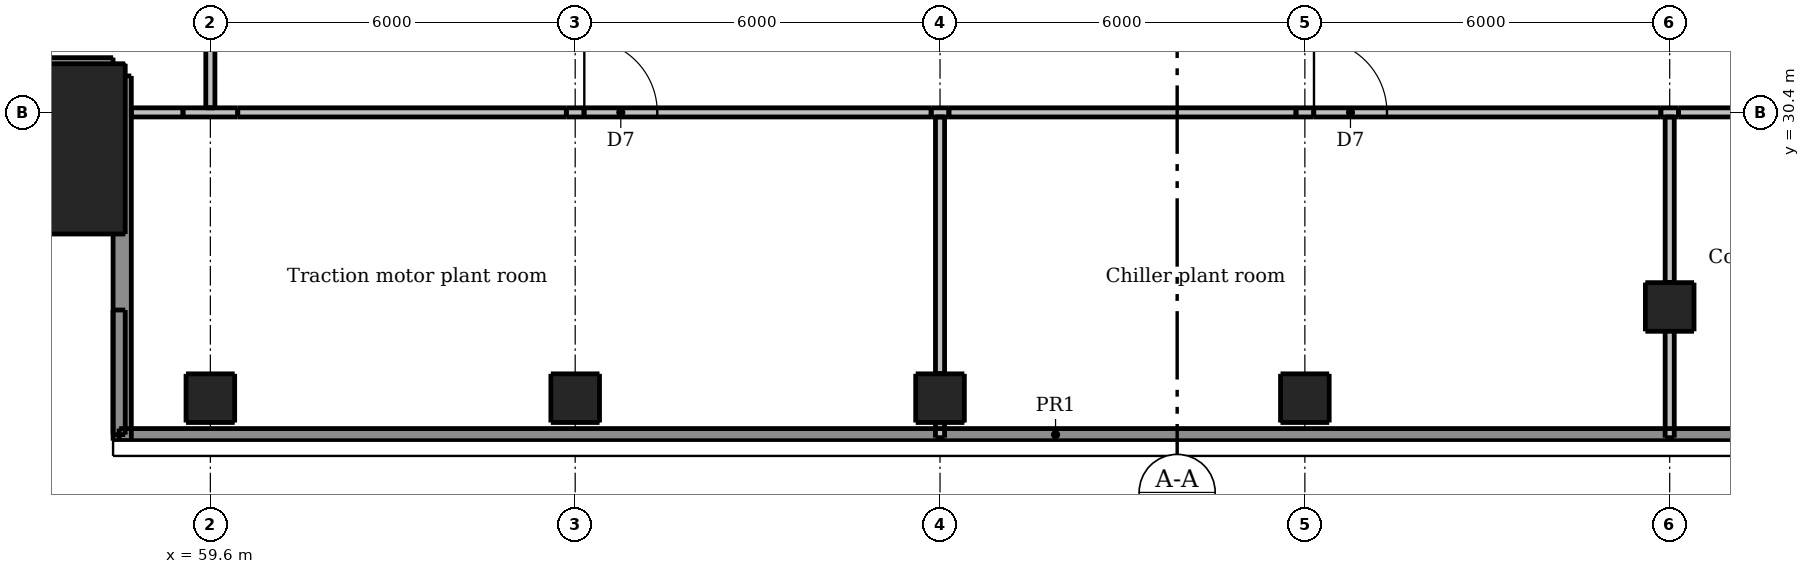
"""IFC4 building model, lengths in metres.
Left out: names, types, materials, properties, quantities, classifications, styles, units other than length and angle.
Written with IfcOpenShell. Run it as: python <this file> out.ifc"""

import sys

from ifc_helpers import new_model, si_unit, direction, frame, frame_2d, origin, origin_2d, place, context, subcontext, project, spatial, rectangle, extrude, element, fill, save


model = new_model("IFC4")
c1 = context("Model", 3, precision=1e-05, world=origin(), true_north=direction((0.0, 1.0)))
c2 = subcontext(c1, "Body", "Model", "MODEL_VIEW")
j1 = project(units=[si_unit("LENGTHUNIT", "METRE"), si_unit("PLANEANGLEUNIT", "RADIAN")], contexts=[c1])
p1 = place(None, origin())
s1 = spatial("IfcSite", under=j1, at=p1, CompositionType="ELEMENT")
p2 = place(p1, origin())
s2 = spatial("IfcBuilding", under=s1, at=p2, CompositionType="ELEMENT")
p3 = place(p2, frame((0.0, 0.0, 286.3)))
s3 = spatial("IfcBuildingStorey", under=s2, at=p3, CompositionType="ELEMENT", Elevation=286.3)
for number, where, z_axis, x_axis in (
    (1, (59.6, 25.7, 0.0), (0.0, 0.0, 1.0), (1.0, 0.0, 0.0)),
    (2, (65.6, 25.7, 0.0), (0.0, 0.0, 1.0), (1.0, 0.0, 0.0)),
    (3, (71.6, 25.7, 0.0), (0.0, 0.0, 1.0), (1.0, 0.0, 0.0)),
    (4, (77.6, 25.7, 0.0), (0.0, 0.0, 1.0), (1.0, 0.0, 0.0)),
    (5, (83.6, 27.2, 0.0), (0.0, 0.0, 1.0), (1.0, 0.0, 0.0)),
):
    element("IfcColumn", number, at=place(p3, frame(where, z_axis=z_axis, x_axis=x_axis)), inside=s3, PredefinedType="COLUMN", context=c2, shape_type="SweptSolid", body=[
        extrude(rectangle(XDim=0.8, YDim=0.8, at=origin_2d()), origin(), (0.0, 0.0, 1.0), 4.2),
    ])
p4 = place(p3, frame((56.8, 29.8, 0.0), z_axis=(0.0, 0.0, 1.0), x_axis=(1.0, 0.0, 0.0)))
e6 = element("IfcColumn", 6, at=p4, inside=s3, PredefinedType="COLUMN", context=c2, shape_type="SweptSolid", body=[
    extrude(rectangle(XDim=2.8, YDim=2.8, at=origin_2d()), origin(), (0.0, 0.0, 1.0), 4.5),
])
p5 = place(p3, frame((53.0, 31.15, 0.0), z_axis=(0.0, 0.0, 1.0), x_axis=(1.0, 0.0, 0.0)))
e7 = element("IfcWall", 7, at=p5, inside=s3, PredefinedType="SOLIDWALL", context=c2, shape_type="SweptSolid", body=[
    extrude(rectangle(XDim=5.0, YDim=0.3, at=frame_2d((2.5, 0.0))), origin(), (0.0, 0.0, 1.0), 4.2),
])
p6 = place(p3, frame((58.15, 31.0, 0.0), z_axis=(0.0, 0.0, 1.0), x_axis=(0.0, -1.0, 0.0)))
e8 = element("IfcWall", 8, at=p6, inside=s3, PredefinedType="SOLIDWALL", context=c2, shape_type="SweptSolid", body=[
    extrude(rectangle(XDim=6.0, YDim=0.3, at=frame_2d((3.0, 0.0))), origin(), (0.0, 0.0, 1.0), 4.2),
])
p7 = place(p3, frame((88.9, 25.1, 4.5), z_axis=(0.0, 0.0, 1.0), x_axis=(-1.0, 0.0, 0.0)))
e9 = element("IfcWall", 9, at=p7, inside=s3, PredefinedType="PARAPET", context=c2, shape_type="SweptSolid", body=[
    extrude(rectangle(XDim=30.8, YDim=0.2, at=frame_2d((15.4, 0.0))), origin(), (0.0, 0.0, 1.0), 1.1),
])
p8 = place(p3, frame((58.1, 25.1, 4.5), z_axis=(0.0, 0.0, 1.0), x_axis=(0.0, 1.0, 0.0)))
e10 = element("IfcWall", 10, at=p8, inside=s3, PredefinedType="PARAPET", context=c2, shape_type="SweptSolid", body=[
    extrude(rectangle(XDim=2.05, YDim=0.2, at=frame_2d((1.025, 0.0))), origin(), (0.0, 0.0, 1.0), 1.1),
])
p9 = place(p3, frame((58.3, 30.4, 0.0), z_axis=(0.0, 0.0, 1.0), x_axis=(1.0, 0.0, 0.0)))
e11 = element("IfcWall", 11, at=p9, inside=s3, PredefinedType="PARTITIONING", context=c2, shape_type="SweptSolid", body=[
    extrude(rectangle(XDim=0.85, YDim=0.15, at=frame_2d((0.425, 0.0))), origin(), (0.0, 0.0, 1.0), 4.2),
])
p10 = place(p3, frame((59.15, 30.4, 0.0), z_axis=(0.0, 0.0, 1.0), x_axis=(1.0, 0.0, 0.0)))
e12 = element("IfcWall", 12, at=p10, inside=s3, PredefinedType="PARTITIONING", context=c2, shape_type="SweptSolid", body=[
    extrude(rectangle(XDim=0.9, YDim=0.15, at=frame_2d((0.45, 0.0))), origin(), (0.0, 0.0, 1.0), 2.897),
])
p11 = place(p3, frame((60.05, 30.4, 0.0), z_axis=(0.0, 0.0, 1.0), x_axis=(1.0, 0.0, 0.0)))
e13 = element("IfcWall", 13, at=p11, inside=s3, PredefinedType="PARTITIONING", context=c2, shape_type="SweptSolid", body=[
    extrude(rectangle(XDim=5.404, YDim=0.15, at=frame_2d((2.702, 0.0))), origin(), (0.0, 0.0, 1.0), 4.2),
])
p12 = place(p3, frame((65.454, 30.4, 0.0), z_axis=(0.0, 0.0, 1.0), x_axis=(1.0, 0.0, 0.0)))
e14 = element("IfcWall", 14, at=p12, inside=s3, PredefinedType="PARTITIONING", context=c2, shape_type="SweptSolid", body=[
    extrude(rectangle(XDim=0.292, YDim=0.15, at=frame_2d((0.146, 0.0))), origin(), (0.0, 0.0, 1.0), 3.365),
])
p13 = place(p3, frame((65.746, 30.4, 0.0), z_axis=(0.0, 0.0, 1.0), x_axis=(1.0, 0.0, 0.0)))
e15 = element("IfcWall", 15, at=p13, inside=s3, PredefinedType="PARTITIONING", context=c2, shape_type="SweptSolid", body=[
    extrude(rectangle(XDim=5.708, YDim=0.15, at=frame_2d((2.854, 0.0))), origin(), (0.0, 0.0, 1.0), 4.2),
])
p14 = place(p13, frame((0.004, 0.0, 0.0)))
e16 = element("IfcOpeningElement", 16, at=p14, cuts=e15, PredefinedType="OPENING", context=c2, shape_type="SweptSolid", body=[
    extrude(rectangle(XDim=1.2, YDim=2.1, at=frame_2d((0.6, 1.05))), frame((0.0, 0.085, 0.0), z_axis=(0.0, -1.0, 0.0), x_axis=(1.0, 0.0, 0.0)), (0.0, 0.0, 1.0), 0.17),
])
p15 = place(p3, frame((71.454, 30.4, 0.0), z_axis=(0.0, 0.0, 1.0), x_axis=(1.0, 0.0, 0.0)))
e17 = element("IfcWall", 17, at=p15, inside=s3, PredefinedType="PARTITIONING", context=c2, shape_type="SweptSolid", body=[
    extrude(rectangle(XDim=0.292, YDim=0.15, at=frame_2d((0.146, 0.0))), origin(), (0.0, 0.0, 1.0), 3.365),
])
p16 = place(p3, frame((71.746, 30.4, 0.0), z_axis=(0.0, 0.0, 1.0), x_axis=(1.0, 0.0, 0.0)))
e18 = element("IfcWall", 18, at=p16, inside=s3, PredefinedType="PARTITIONING", context=c2, shape_type="SweptSolid", body=[
    extrude(rectangle(XDim=5.708, YDim=0.15, at=frame_2d((2.854, 0.0))), origin(), (0.0, 0.0, 1.0), 4.2),
])
p17 = place(p3, frame((77.454, 30.4, 0.0), z_axis=(0.0, 0.0, 1.0), x_axis=(1.0, 0.0, 0.0)))
e19 = element("IfcWall", 19, at=p17, inside=s3, PredefinedType="PARTITIONING", context=c2, shape_type="SweptSolid", body=[
    extrude(rectangle(XDim=0.292, YDim=0.15, at=frame_2d((0.146, 0.0))), origin(), (0.0, 0.0, 1.0), 3.365),
])
p18 = place(p3, frame((77.746, 30.4, 0.0), z_axis=(0.0, 0.0, 1.0), x_axis=(1.0, 0.0, 0.0)))
e20 = element("IfcWall", 20, at=p18, inside=s3, PredefinedType="PARTITIONING", context=c2, shape_type="SweptSolid", body=[
    extrude(rectangle(XDim=5.708, YDim=0.15, at=frame_2d((2.854, 0.0))), origin(), (0.0, 0.0, 1.0), 4.2),
])
p19 = place(p18, frame((0.004, 0.0, 0.0)))
e21 = element("IfcOpeningElement", 21, at=p19, cuts=e20, PredefinedType="OPENING", context=c2, shape_type="SweptSolid", body=[
    extrude(rectangle(XDim=1.2, YDim=2.1, at=frame_2d((0.6, 1.05))), frame((0.0, 0.085, 0.0), z_axis=(0.0, -1.0, 0.0), x_axis=(1.0, 0.0, 0.0)), (0.0, 0.0, 1.0), 0.17),
])
p20 = place(p3, frame((83.454, 30.4, 0.0), z_axis=(0.0, 0.0, 1.0), x_axis=(1.0, 0.0, 0.0)))
e22 = element("IfcWall", 22, at=p20, inside=s3, PredefinedType="PARTITIONING", context=c2, shape_type="SweptSolid", body=[
    extrude(rectangle(XDim=0.292, YDim=0.15, at=frame_2d((0.146, 0.0))), origin(), (0.0, 0.0, 1.0), 3.365),
])
p21 = place(p3, frame((83.746, 30.4, 0.0), z_axis=(0.0, 0.0, 1.0), x_axis=(1.0, 0.0, 0.0)))
e23 = element("IfcWall", 23, at=p21, inside=s3, PredefinedType="PARTITIONING", context=c2, shape_type="SweptSolid", body=[
    extrude(rectangle(XDim=4.708, YDim=0.15, at=frame_2d((2.354, 0.0))), origin(), (0.0, 0.0, 1.0), 4.2),
])
p22 = place(p21, frame((1.954, 0.0, 0.0)))
e24 = element("IfcOpeningElement", 24, at=p22, cuts=e23, PredefinedType="OPENING", context=c2, shape_type="SweptSolid", body=[
    extrude(rectangle(XDim=1.2, YDim=2.1, at=frame_2d((0.6, 1.05))), frame((0.0, 0.085, 0.0), z_axis=(0.0, -1.0, 0.0), x_axis=(1.0, 0.0, 0.0)), (0.0, 0.0, 1.0), 0.17),
])
p23 = place(p3, frame((59.6, 30.475, 0.0), z_axis=(0.0, 0.0, 1.0), x_axis=(0.0, 1.0, 0.0)))
e25 = element("IfcWall", 25, at=p23, inside=s3, PredefinedType="PARTITIONING", context=c2, shape_type="SweptSolid", body=[
    extrude(rectangle(XDim=5.779, YDim=0.15, at=frame_2d((2.89, 0.0))), origin(), (0.0, 0.0, 1.0), 2.897),
])
p24 = place(p3, frame((71.6, 25.05, 0.0), z_axis=(0.0, 0.0, 1.0), x_axis=(0.0, 1.0, 0.0)))
e26 = element("IfcWall", 26, at=p24, inside=s3, PredefinedType="PARTITIONING", context=c2, shape_type="SweptSolid", body=[
    extrude(rectangle(XDim=1.05, YDim=0.15, at=frame_2d((0.525, 0.0))), origin(), (0.0, 0.0, 1.0), 4.2),
])
p25 = place(p3, frame((71.6, 26.1, 0.0), z_axis=(0.0, 0.0, 1.0), x_axis=(0.0, 1.0, 0.0)))
e27 = element("IfcWall", 27, at=p25, inside=s3, PredefinedType="PARTITIONING", context=c2, shape_type="SweptSolid", body=[
    extrude(rectangle(XDim=4.225, YDim=0.15, at=frame_2d((2.112, 0.0))), origin(), (0.0, 0.0, 1.0), 3.365),
])
p26 = place(p3, frame((83.6, 25.05, 0.0), z_axis=(0.0, 0.0, 1.0), x_axis=(0.0, 1.0, 0.0)))
e28 = element("IfcWall", 28, at=p26, inside=s3, PredefinedType="PARTITIONING", context=c2, shape_type="SweptSolid", body=[
    extrude(rectangle(XDim=2.55, YDim=0.15, at=frame_2d((1.275, 0.0))), origin(), (0.0, 0.0, 1.0), 4.2),
])
p27 = place(p3, frame((83.6, 27.6, 0.0), z_axis=(0.0, 0.0, 1.0), x_axis=(0.0, 1.0, 0.0)))
e29 = element("IfcWall", 29, at=p27, inside=s3, PredefinedType="PARTITIONING", context=c2, shape_type="SweptSolid", body=[
    extrude(rectangle(XDim=2.725, YDim=0.15, at=frame_2d((1.362, 0.0))), origin(), (0.0, 0.0, 1.0), 3.365),
])
p28 = place(p14, origin())
e30 = element("IfcDoor", 30, at=p28, inside=s3, OperationType="SINGLE_SWING_LEFT", PredefinedType="DOOR", context=c2, shape_type="SweptSolid", body=[
    extrude(rectangle(XDim=1.2, YDim=2.1, at=frame_2d((0.6, 1.05))), frame((0.0, 0.025, 0.0), z_axis=(0.0, -1.0, 0.0), x_axis=(1.0, 0.0, 0.0)), (0.0, 0.0, 1.0), 0.05),
])
fill(e16, e30)
p29 = place(p19, origin())
e31 = element("IfcDoor", 31, at=p29, inside=s3, OperationType="SINGLE_SWING_LEFT", PredefinedType="DOOR", context=c2, shape_type="SweptSolid", body=[
    extrude(rectangle(XDim=1.2, YDim=2.1, at=frame_2d((0.6, 1.05))), frame((0.0, 0.025, 0.0), z_axis=(0.0, -1.0, 0.0), x_axis=(1.0, 0.0, 0.0)), (0.0, 0.0, 1.0), 0.05),
])
fill(e21, e31)
save(model, sys.argv[1])
